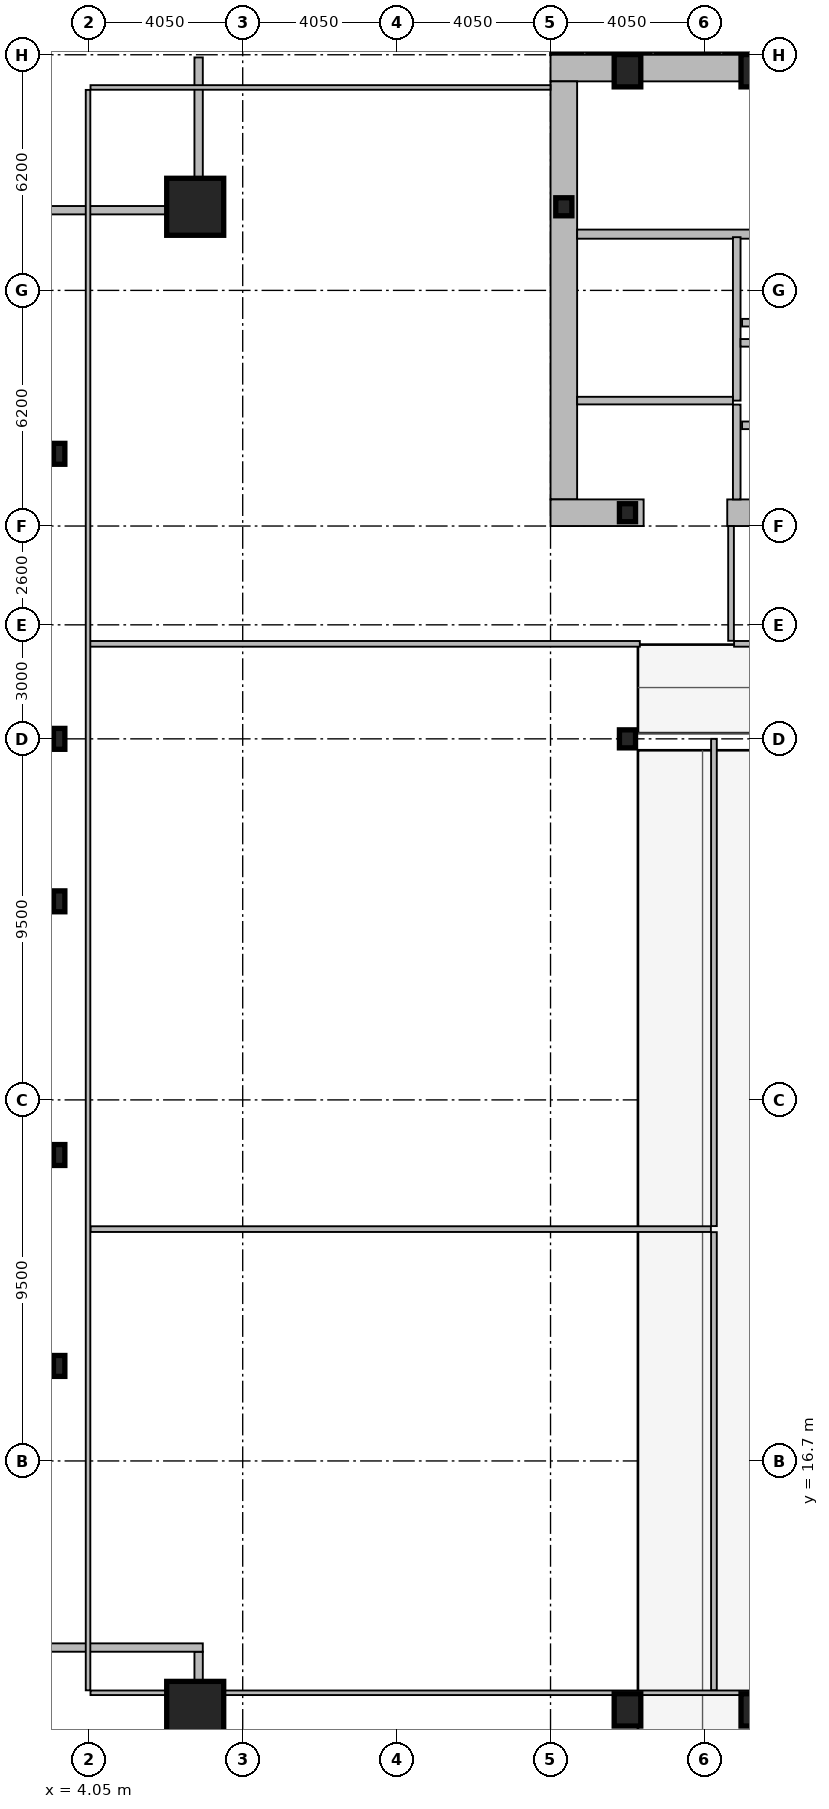
"""IFC4 building model, lengths in metres.
Left out: names, types, materials, properties, quantities, classifications, styles, units other than length and angle.
Written with IfcOpenShell. Run it as: python <this file> out.ifc"""

import sys

from ifc_helpers import new_model, si_unit, direction, frame, frame_2d, origin, origin_2d, place, context, subcontext, project, spatial, rectangle, hollow_rectangle, i_section, extrude, element, fill, save


model = new_model("IFC4")
c1 = context("Model", 3, precision=1e-05, world=origin(), true_north=direction((0.0, 1.0)))
c2 = subcontext(c1, "Body", "Model", "MODEL_VIEW")
j1 = project(units=[si_unit("LENGTHUNIT", "METRE"), si_unit("PLANEANGLEUNIT", "RADIAN")], contexts=[c1])
p1 = place(None, origin())
s1 = spatial("IfcSite", under=j1, at=p1, CompositionType="ELEMENT")
p2 = place(p1, origin())
s2 = spatial("IfcBuilding", under=s1, at=p2, CompositionType="ELEMENT")
p3 = place(p2, frame((0.0, 0.0, 106.6)))
s3 = spatial("IfcBuildingStorey", under=s2, at=p3, CompositionType="ELEMENT", Elevation=106.6)
p4 = place(p3, frame((16.2, 53.35, 0.0), z_axis=(0.0, 0.0, 1.0), x_axis=(1.0, 0.0, 0.0)))
e1 = element("IfcWall", 1, at=p4, inside=s3, PredefinedType="SHEAR", context=c2, shape_type="SweptSolid", body=[
    extrude(rectangle(XDim=40.5, YDim=0.7, at=frame_2d((20.25, 0.0))), origin(), (0.0, 0.0, 1.0), 4.24),
])
p5 = place(p3, frame((16.55, 42.0, 0.0), z_axis=(0.0, 0.0, 1.0), x_axis=(0.0, 1.0, 0.0)))
e2 = element("IfcWall", 2, at=p5, inside=s3, PredefinedType="SHEAR", context=c2, shape_type="SweptSolid", body=[
    extrude(rectangle(XDim=11.0, YDim=0.7, at=frame_2d((5.5, 0.0))), origin(), (0.0, 0.0, 1.0), 4.24),
])
p6 = place(p3, frame((18.65, 41.65, 0.0), z_axis=(0.0, 0.0, 1.0), x_axis=(-1.0, 0.0, 0.0)))
e3 = element("IfcWall", 3, at=p6, inside=s3, PredefinedType="SHEAR", context=c2, shape_type="SweptSolid", body=[
    extrude(rectangle(XDim=2.45, YDim=0.7, at=frame_2d((1.225, 0.0))), origin(), (0.0, 0.0, 1.0), 4.24),
])
p7 = place(p3, frame((32.3, 41.65, 0.0), z_axis=(0.0, 0.0, 1.0), x_axis=(-1.0, 0.0, 0.0)))
e4 = element("IfcWall", 4, at=p7, inside=s3, PredefinedType="SHEAR", context=c2, shape_type="SweptSolid", body=[
    extrude(rectangle(XDim=11.45, YDim=0.7, at=frame_2d((5.725, 0.0))), origin(), (0.0, 0.0, 1.0), 4.24),
])
p8 = place(p3, frame((16.9, 48.98, 0.0), z_axis=(0.0, 0.0, 1.0), x_axis=(1.0, 0.0, 0.0)))
e5 = element("IfcWall", 5, at=p8, inside=s3, PredefinedType="SHEAR", context=c2, shape_type="SweptSolid", body=[
    extrude(rectangle(XDim=7.32, YDim=0.24, at=frame_2d((3.66, 0.0))), origin(), (0.0, 0.0, 1.0), 4.24),
])
p9 = place(p8, frame((0.22, 0.0, 0.0)))
e6 = element("IfcOpeningElement", 6, at=p9, cuts=e5, PredefinedType="OPENING", context=c2, shape_type="SweptSolid", body=[
    extrude(rectangle(XDim=1.05, YDim=2.15, at=frame_2d((0.525, 1.075))), frame((0.0, 0.13, 0.0), z_axis=(0.0, -1.0, 0.0), x_axis=(1.0, 0.0, 0.0)), (0.0, 0.0, 1.0), 0.26),
])
for number, where, z_axis, x_axis in (
    (7, (6.85, 10.15, 0.0), (0.0, 0.0, 1.0), (1.0, 0.0, 0.0)),
    (8, (6.85, 49.7, 0.0), (0.0, 0.0, 1.0), (1.0, 0.0, 0.0)),
):
    element("IfcColumn", number, at=place(p3, frame(where, z_axis=z_axis, x_axis=x_axis)), inside=s3, PredefinedType="COLUMN", context=c2, shape_type="SweptSolid", body=[
        extrude(hollow_rectangle(XDim=1.5, YDim=1.5, WallThickness=0.07, at=origin_2d()), origin(), (0.0, 0.0, 1.0), 4.4),
    ])
for number, where, z_axis, x_axis in (
    (9, (18.225, 10.15, 0.0), (0.0, 0.0, 1.0), (1.0, 0.0, 0.0)),
    (10, (21.562, 10.15, 0.0), (0.0, 0.0, 1.0), (1.0, 0.0, 0.0)),
    (11, (18.225, 53.28, 0.0), (0.0, 0.0, 1.0), (1.0, 0.0, 0.0)),
    (12, (21.562, 53.28, 0.0), (0.0, 0.0, 1.0), (1.0, 0.0, 0.0)),
):
    element("IfcColumn", number, at=place(p3, frame(where, z_axis=z_axis, x_axis=x_axis)), inside=s3, PredefinedType="COLUMN", context=c2, shape_type="SweptSolid", body=[
        extrude(hollow_rectangle(XDim=0.7, YDim=0.85, WallThickness=0.05, at=origin_2d()), origin(), (0.0, 0.0, 1.0), 4.4),
    ])
for number, where, z_axis, x_axis in (
    (13, (3.27, 19.2, 0.0), (0.0, 0.0, 1.0), (1.0, 0.0, 0.0)),
    (14, (3.27, 24.75, 0.0), (0.0, 0.0, 1.0), (1.0, 0.0, 0.0)),
    (15, (3.27, 31.425, 0.0), (0.0, 0.0, 1.0), (1.0, 0.0, 0.0)),
    (16, (3.27, 35.7, 0.0), (0.0, 0.0, 1.0), (1.0, 0.0, 0.0)),
    (17, (3.27, 43.2, 0.0), (0.0, 0.0, 1.0), (1.0, 0.0, 0.0)),
):
    element("IfcColumn", number, at=place(p3, frame(where, z_axis=z_axis, x_axis=x_axis)), inside=s3, PredefinedType="COLUMN", context=c2, shape_type="SweptSolid", body=[
        extrude(i_section(OverallWidth=0.3, OverallDepth=0.55, WebThickness=0.015, FlangeThickness=0.029, at=origin_2d()), origin(), (0.0, 0.0, 1.0), 4.4),
    ])
for number, where, z_axis, x_axis in (
    (18, (16.55, 49.7, 0.0), (0.0, 0.0, 1.0), (1.0, 0.0, 0.0)),
    (19, (18.225, 35.7, 0.0), (0.0, 0.0, 1.0), (1.0, 0.0, 0.0)),
    (20, (18.225, 41.65, 0.0), (0.0, 0.0, 1.0), (1.0, 0.0, 0.0)),
):
    element("IfcColumn", number, at=place(p3, frame(where, z_axis=z_axis, x_axis=x_axis)), inside=s3, PredefinedType="COLUMN", context=c2, shape_type="SweptSolid", body=[
        extrude(i_section(OverallWidth=0.424, OverallDepth=0.474, WebThickness=0.048, FlangeThickness=0.077, at=origin_2d()), origin(), (0.0, 0.0, 1.0), 4.4),
    ])
p10 = place(p3, frame((6.94, 7.77, 0.0), z_axis=(0.0, 0.0, 1.0), x_axis=(0.0, 1.0, 0.0)))
e21 = element("IfcWall", 21, at=p10, inside=s3, PredefinedType="SOLIDWALL", context=c2, shape_type="SweptSolid", body=[
    extrude(rectangle(XDim=3.91, YDim=0.22, at=frame_2d((1.955, 0.0))), origin(), (0.0, 0.0, 1.0), 3.63),
])
for number, where, z_axis, x_axis in (
    (22, (7.05, 11.79, 0.0), (0.0, 0.0, 1.0), (-1.0, 0.0, 0.0)),
    (23, (2.83, 49.61, 0.0), (0.0, 0.0, 1.0), (1.0, 0.0, 0.0)),
):
    element("IfcWall", number, at=place(p3, frame(where, z_axis=z_axis, x_axis=x_axis)), inside=s3, PredefinedType="SOLIDWALL", context=c2, shape_type="SweptSolid", body=[
        extrude(rectangle(XDim=4.22, YDim=0.22, at=frame_2d((2.11, 0.0))), origin(), (0.0, 0.0, 1.0), 3.63),
    ])
p11 = place(p3, frame((6.94, 49.72, 0.0), z_axis=(0.0, 0.0, 1.0), x_axis=(0.0, 1.0, 0.0)))
e24 = element("IfcWall", 24, at=p11, inside=s3, PredefinedType="SOLIDWALL", context=c2, shape_type="SweptSolid", body=[
    extrude(rectangle(XDim=3.91, YDim=0.22, at=frame_2d((1.955, 0.0))), origin(), (0.0, 0.0, 1.0), 3.63),
])
p12 = place(p3, frame((24.21, 43.95, 0.0), z_axis=(0.0, 0.0, 1.0), x_axis=(-1.0, 0.0, 0.0)))
e25 = element("IfcWall", 25, at=p12, inside=s3, PredefinedType="PARTITIONING", context=c2, shape_type="SweptSolid", body=[
    extrude(rectangle(XDim=2.97, YDim=0.2, at=frame_2d((1.485, 0.0))), origin(), (0.0, 0.0, 1.0), 4.24),
])
p13 = place(p12, frame((0.86, 0.0, 0.0)))
e26 = element("IfcOpeningElement", 26, at=p13, cuts=e25, PredefinedType="OPENING", context=c2, shape_type="SweptSolid", body=[
    extrude(rectangle(XDim=1.3, YDim=2.18, at=frame_2d((0.65, 1.09))), frame((0.0, 0.11, 0.0), z_axis=(0.0, -1.0, 0.0), x_axis=(1.0, 0.0, 0.0)), (0.0, 0.0, 1.0), 0.22),
])
p14 = place(p3, frame((24.21, 46.65, 0.0), z_axis=(0.0, 0.0, 1.0), x_axis=(-1.0, 0.0, 0.0)))
e27 = element("IfcWall", 27, at=p14, inside=s3, PredefinedType="PARTITIONING", context=c2, shape_type="SweptSolid", body=[
    extrude(rectangle(XDim=2.97, YDim=0.2, at=frame_2d((1.485, 0.0))), origin(), (0.0, 0.0, 1.0), 4.24),
])
p15 = place(p14, frame((0.91, 0.0, 0.0)))
e28 = element("IfcOpeningElement", 28, at=p15, cuts=e27, PredefinedType="OPENING", context=c2, shape_type="SweptSolid", body=[
    extrude(rectangle(XDim=1.2, YDim=2.18, at=frame_2d((0.6, 1.09))), frame((0.0, 0.11, 0.0), z_axis=(0.0, -1.0, 0.0), x_axis=(1.0, 0.0, 0.0)), (0.0, 0.0, 1.0), 0.22),
])
p16 = place(p3, frame((21.1, 44.6, 0.0), z_axis=(0.0, 0.0, 1.0), x_axis=(0.0, 1.0, 0.0)))
e29 = element("IfcWall", 29, at=p16, inside=s3, PredefinedType="PARTITIONING", context=c2, shape_type="SweptSolid", body=[
    extrude(rectangle(XDim=4.3, YDim=0.2, at=frame_2d((2.15, 0.0))), origin(), (0.0, 0.0, 1.0), 4.24),
])
p17 = place(p3, frame((16.9, 44.6, 0.0), z_axis=(0.0, 0.0, 1.0), x_axis=(1.0, 0.0, 0.0)))
e30 = element("IfcWall", 30, at=p17, inside=s3, PredefinedType="PARTITIONING", context=c2, shape_type="SweptSolid", body=[
    extrude(rectangle(XDim=4.1, YDim=0.2, at=frame_2d((2.05, 0.0))), origin(), (0.0, 0.0, 1.0), 4.24),
])
p18 = place(p17, frame((1.25, 0.0, 0.0)))
e31 = element("IfcOpeningElement", 31, at=p18, cuts=e30, PredefinedType="OPENING", context=c2, shape_type="SweptSolid", body=[
    extrude(rectangle(XDim=1.05, YDim=2.15, at=frame_2d((0.525, 1.075))), frame((0.0, 0.11, 0.0), z_axis=(0.0, -1.0, 0.0), x_axis=(1.0, 0.0, 0.0)), (0.0, 0.0, 1.0), 0.22),
])
p19 = place(p3, frame((21.2, 46.12, 0.0), z_axis=(0.0, 0.0, 1.0), x_axis=(1.0, 0.0, 0.0)))
e32 = element("IfcWall", 32, at=p19, inside=s3, PredefinedType="PARTITIONING", context=c2, shape_type="SweptSolid", body=[
    extrude(rectangle(XDim=3.02, YDim=0.2, at=frame_2d((1.51, 0.0))), origin(), (0.0, 0.0, 1.0), 4.24),
])
p20 = place(p3, frame((21.1, 42.0, 0.0), z_axis=(0.0, 0.0, 1.0), x_axis=(0.0, 1.0, 0.0)))
e33 = element("IfcWall", 33, at=p20, inside=s3, PredefinedType="PARTITIONING", context=c2, shape_type="SweptSolid", body=[
    extrude(rectangle(XDim=2.495, YDim=0.2, at=frame_2d((1.248, 0.0))), origin(), (0.0, 0.0, 1.0), 4.24),
])
p21 = place(p20, frame((0.38, 0.0, 0.0)))
e34 = element("IfcOpeningElement", 34, at=p21, cuts=e33, PredefinedType="OPENING", context=c2, shape_type="SweptSolid", body=[
    extrude(rectangle(XDim=1.05, YDim=2.15, at=frame_2d((0.525, 1.075))), frame((0.0, 0.11, 0.0), z_axis=(0.0, -1.0, 0.0), x_axis=(1.0, 0.0, 0.0)), (0.0, 0.0, 1.0), 0.22),
])
p22 = place(p3, frame((20.5, 10.665, 0.0), z_axis=(0.0, 0.0, 1.0), x_axis=(0.0, 1.0, 0.0)))
e35 = element("IfcWall", 35, at=p22, inside=s3, PredefinedType="PARTITIONING", context=c2, shape_type="SweptSolid", body=[
    extrude(rectangle(XDim=12.055, YDim=0.15, at=frame_2d((6.027, 0.0))), origin(), (0.0, 0.0, 1.0), 3.68),
])
p23 = place(p22, frame((5.2, 0.0, 0.0)))
e36 = element("IfcOpeningElement", 36, at=p23, cuts=e35, PredefinedType="OPENING", context=c2, shape_type="SweptSolid", body=[
    extrude(rectangle(XDim=1.6, YDim=2.15, at=frame_2d((0.8, 1.075))), frame((0.0, 0.085, 0.0), z_axis=(0.0, -1.0, 0.0), x_axis=(1.0, 0.0, 0.0)), (0.0, 0.0, 1.0), 0.17),
])
p24 = place(p3, frame((20.5, 22.88, 0.0), z_axis=(0.0, 0.0, 1.0), x_axis=(0.0, 1.0, 0.0)))
e37 = element("IfcWall", 37, at=p24, inside=s3, PredefinedType="PARTITIONING", context=c2, shape_type="SweptSolid", body=[
    extrude(rectangle(XDim=12.82, YDim=0.15, at=frame_2d((6.41, 0.0))), origin(), (0.0, 0.0, 1.0), 3.68),
])
p25 = place(p24, frame((5.2, 0.0, 0.0)))
e38 = element("IfcOpeningElement", 38, at=p25, cuts=e37, PredefinedType="OPENING", context=c2, shape_type="SweptSolid", body=[
    extrude(rectangle(XDim=1.0, YDim=2.05, at=frame_2d((0.5, 1.025))), frame((0.0, 0.085, 0.0), z_axis=(0.0, -1.0, 0.0), x_axis=(1.0, 0.0, 0.0)), (0.0, 0.0, 1.0), 0.17),
])
p26 = place(p3, frame((4.095, 22.8, 0.0), z_axis=(0.0, 0.0, 1.0), x_axis=(1.0, 0.0, 0.0)))
e39 = element("IfcWall", 39, at=p26, inside=s3, PredefinedType="PARTITIONING", context=c2, shape_type="SweptSolid", body=[
    extrude(rectangle(XDim=16.325, YDim=0.15, at=frame_2d((8.163, 0.0))), origin(), (0.0, 0.0, 1.0), 3.53),
])
p27 = place(p3, frame((21.03, 38.2, 0.0), z_axis=(0.0, 0.0, 1.0), x_axis=(1.0, 0.0, 0.0)))
e40 = element("IfcWall", 40, at=p27, inside=s3, PredefinedType="PARTITIONING", context=c2, shape_type="SweptSolid", body=[
    extrude(rectangle(XDim=3.69, YDim=0.15, at=frame_2d((1.845, 0.0))), origin(), (0.0, 0.0, 1.0), 3.53),
])
p28 = place(p27, frame((1.2, 0.0, 0.0)))
e41 = element("IfcOpeningElement", 41, at=p28, cuts=e40, PredefinedType="OPENING", context=c2, shape_type="SweptSolid", body=[
    extrude(rectangle(XDim=0.95, YDim=2.05, at=frame_2d((0.475, 1.025))), frame((0.0, 0.085, 0.0), z_axis=(0.0, -1.0, 0.0), x_axis=(1.0, 0.0, 0.0)), (0.0, 0.0, 1.0), 0.17),
])
p29 = place(p3, frame((20.95, 38.28, 0.0), z_axis=(0.0, 0.0, 1.0), x_axis=(0.0, 1.0, 0.0)))
e42 = element("IfcWall", 42, at=p29, inside=s3, PredefinedType="PARTITIONING", context=c2, shape_type="SweptSolid", body=[
    extrude(rectangle(XDim=3.02, YDim=0.15, at=frame_2d((1.51, 0.0))), origin(), (0.0, 0.0, 1.0), 4.24),
])
p30 = place(p3, frame((4.03, 38.2, 0.0), z_axis=(0.0, 0.0, 1.0), x_axis=(1.0, 0.0, 0.0)))
e43 = element("IfcWall", 43, at=p30, inside=s3, PredefinedType="PARTITIONING", context=c2, shape_type="SweptSolid", body=[
    extrude(rectangle(XDim=14.52, YDim=0.15, at=frame_2d((7.26, 0.0))), origin(), (0.0, 0.0, 1.0), 3.53),
])
p31 = place(p30, frame((2.8, 0.0, 0.0)))
e44 = element("IfcOpeningElement", 44, at=p31, cuts=e43, PredefinedType="OPENING", context=c2, shape_type="SweptSolid", body=[
    extrude(rectangle(XDim=1.0, YDim=2.05, at=frame_2d((0.5, 1.025))), frame((0.0, 0.085, 0.0), z_axis=(0.0, -1.0, 0.0), x_axis=(1.0, 0.0, 0.0)), (0.0, 0.0, 1.0), 0.17),
])
p32 = place(p3, frame((4.03, 10.665, 0.0), z_axis=(0.0, 0.0, 1.0), x_axis=(0.0, 1.0, 0.0)))
e45 = element("IfcWall", 45, at=p32, inside=s3, PredefinedType="PARTITIONING", context=c2, shape_type="SweptSolid", body=[
    extrude(rectangle(XDim=42.11, YDim=0.12, at=frame_2d((21.055, 0.0))), origin(), (0.0, 0.0, 1.0), 3.53),
])
p33 = place(p3, frame((4.095, 52.84, 0.0), z_axis=(0.0, 0.0, 1.0), x_axis=(1.0, 0.0, 0.0)))
e46 = element("IfcWall", 46, at=p33, inside=s3, PredefinedType="PARTITIONING", context=c2, shape_type="SweptSolid", body=[
    extrude(rectangle(XDim=12.105, YDim=0.12, at=frame_2d((6.052, 0.0))), origin(), (0.0, 0.0, 1.0), 4.24),
])
p34 = place(p3, frame((4.095, 10.6, 0.0), z_axis=(0.0, 0.0, 1.0), x_axis=(1.0, 0.0, 0.0)))
e47 = element("IfcWall", 47, at=p34, inside=s3, PredefinedType="PARTITIONING", context=c2, shape_type="SweptSolid", body=[
    extrude(rectangle(XDim=64.71, YDim=0.12, at=frame_2d((32.355, 0.0))), origin(), (0.0, 0.0, 1.0), 3.53),
])
p35 = place(p9, origin())
e48 = element("IfcDoor", 48, at=p35, inside=s3, OperationType="SINGLE_SWING_LEFT", PredefinedType="DOOR", context=c2, shape_type="SweptSolid", body=[
    extrude(rectangle(XDim=1.05, YDim=2.15, at=frame_2d((0.525, 1.075))), frame((0.0, 0.025, 0.0), z_axis=(0.0, -1.0, 0.0), x_axis=(1.0, 0.0, 0.0)), (0.0, 0.0, 1.0), 0.05),
])
fill(e6, e48)
p36 = place(p18, origin())
e49 = element("IfcDoor", 49, at=p36, inside=s3, OperationType="SINGLE_SWING_RIGHT", PredefinedType="DOOR", context=c2, shape_type="SweptSolid", body=[
    extrude(rectangle(XDim=1.05, YDim=2.15, at=frame_2d((0.525, 1.075))), frame((0.0, 0.025, 0.0), z_axis=(0.0, -1.0, 0.0), x_axis=(1.0, 0.0, 0.0)), (0.0, 0.0, 1.0), 0.05),
])
fill(e31, e49)
p37 = place(p21, origin())
e50 = element("IfcDoor", 50, at=p37, inside=s3, OperationType="SINGLE_SWING_LEFT", PredefinedType="DOOR", context=c2, shape_type="SweptSolid", body=[
    extrude(rectangle(XDim=1.05, YDim=2.15, at=frame_2d((0.525, 1.075))), frame((0.0, 0.025, 0.0), z_axis=(0.0, -1.0, 0.0), x_axis=(1.0, 0.0, 0.0)), (0.0, 0.0, 1.0), 0.05),
])
fill(e34, e50)
p38 = place(p23, origin())
e51 = element("IfcDoor", 51, at=p38, inside=s3, OperationType="DOUBLE_DOOR_SINGLE_SWING", PredefinedType="DOOR", context=c2, shape_type="SweptSolid", body=[
    extrude(rectangle(XDim=1.6, YDim=2.15, at=frame_2d((0.8, 1.075))), frame((0.0, 0.025, 0.0), z_axis=(0.0, -1.0, 0.0), x_axis=(1.0, 0.0, 0.0)), (0.0, 0.0, 1.0), 0.05),
])
fill(e36, e51)
p39 = place(p25, origin())
e52 = element("IfcDoor", 52, at=p39, inside=s3, OperationType="SINGLE_SWING_RIGHT", PredefinedType="DOOR", context=c2, shape_type="SweptSolid", body=[
    extrude(rectangle(XDim=1.0, YDim=2.05, at=frame_2d((0.5, 1.025))), frame((0.0, 0.025, 0.0), z_axis=(0.0, -1.0, 0.0), x_axis=(1.0, 0.0, 0.0)), (0.0, 0.0, 1.0), 0.05),
])
fill(e38, e52)
p40 = place(p31, origin())
e53 = element("IfcDoor", 53, at=p40, inside=s3, OperationType="SINGLE_SWING_LEFT", PredefinedType="DOOR", context=c2, shape_type="SweptSolid", body=[
    extrude(rectangle(XDim=1.0, YDim=2.05, at=frame_2d((0.5, 1.025))), frame((0.0, 0.025, 0.0), z_axis=(0.0, -1.0, 0.0), x_axis=(1.0, 0.0, 0.0)), (0.0, 0.0, 1.0), 0.05),
])
fill(e44, e53)
save(model, sys.argv[1])
